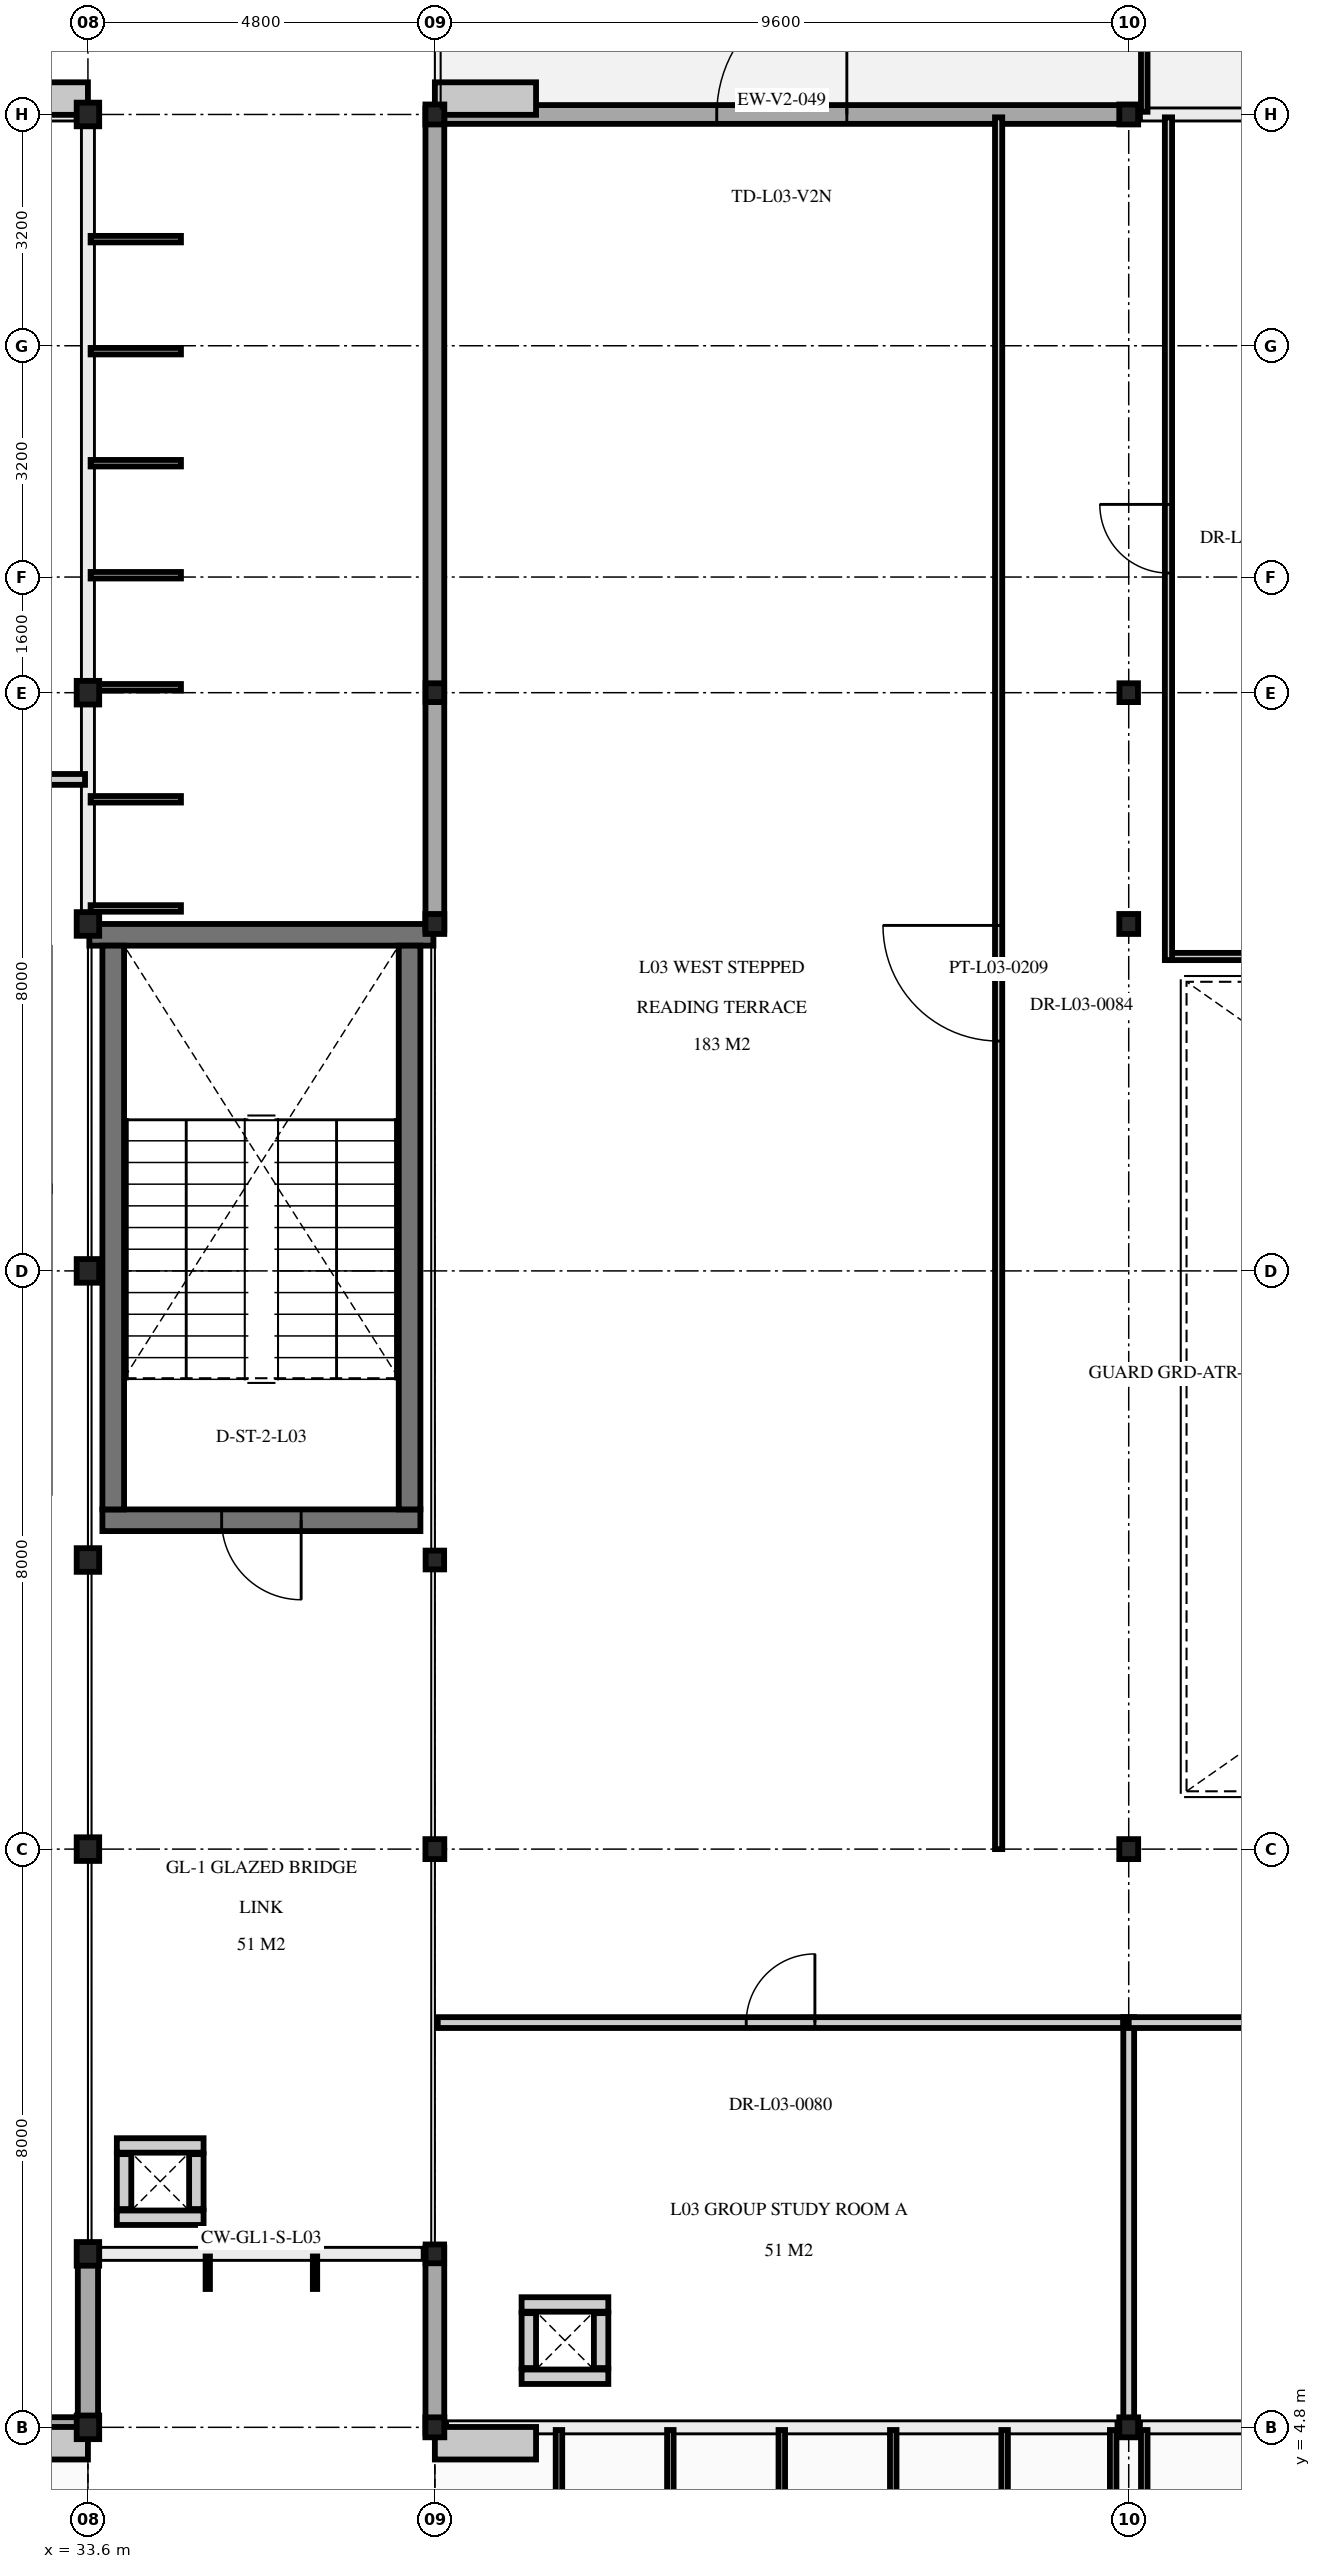
"""IFC4 building model, lengths in metres.
Left out: names, types, materials, properties, quantities, classifications, styles, units other than length and angle.
Written with IfcOpenShell. Run it as: python <this file> out.ifc"""

import sys

from ifc_helpers import new_model, si_unit, direction, frame, frame_2d, origin, origin_2d, place, context, subcontext, project, spatial, rectangle, i_section, extrude, element, fill, save


model = new_model("IFC4")
c1 = context("Model", 3, precision=1e-05, world=origin(), true_north=direction((0.0, 1.0)))
c2 = subcontext(c1, "Body", "Model", "MODEL_VIEW")
j1 = project(units=[si_unit("LENGTHUNIT", "METRE"), si_unit("PLANEANGLEUNIT", "RADIAN")], contexts=[c1])
p1 = place(None, origin())
s1 = spatial("IfcSite", under=j1, at=p1, CompositionType="ELEMENT")
p2 = place(p1, origin())
s2 = spatial("IfcBuilding", under=s1, at=p2, CompositionType="ELEMENT")
p3 = place(p2, frame((0.0, 0.0, 14.1)))
s3 = spatial("IfcBuildingStorey", under=s2, at=p3, CompositionType="ELEMENT", Elevation=14.1)
for number, where, z_axis, x_axis in (
    (1, (33.6, 4.8, 0.0), (0.0, 0.0, 1.0), (1.0, 0.0, 0.0)),
    (2, (33.6, 36.8, 0.0), (0.0, 0.0, 1.0), (1.0, 0.0, 0.0)),
    (3, (33.6, 7.2, 0.0), (0.0, 0.0, 1.0), (1.0, 0.0, 0.0)),
    (4, (33.6, 12.8, 0.0), (0.0, 0.0, 1.0), (1.0, 0.0, 0.0)),
    (5, (33.6, 16.8, 0.0), (0.0, 0.0, 1.0), (1.0, 0.0, 0.0)),
    (6, (33.6, 20.8, 0.0), (0.0, 0.0, 1.0), (1.0, 0.0, 0.0)),
    (7, (33.6, 25.6, 0.0), (0.0, 0.0, 1.0), (1.0, 0.0, 0.0)),
    (8, (33.6, 28.8, 0.0), (0.0, 0.0, 1.0), (1.0, 0.0, 0.0)),
):
    element("IfcColumn", number, at=place(p3, frame(where, z_axis=z_axis, x_axis=x_axis)), inside=s3, PredefinedType="COLUMN", context=c2, shape_type="SweptSolid", body=[
        extrude(i_section(OverallWidth=0.311, OverallDepth=0.327, WebThickness=0.016, FlangeThickness=0.025, at=origin_2d()), origin(), (0.0, 0.0, 1.0), 4.5),
    ])
for number, where, z_axis, x_axis in (
    (9, (38.4, 4.8, 0.0), (0.0, 0.0, 1.0), (1.0, 0.0, 0.0)),
    (10, (38.4, 12.8, 0.0), (0.0, 0.0, 1.0), (1.0, 0.0, 0.0)),
    (11, (38.4, 25.6, 0.0), (0.0, 0.0, 1.0), (1.0, 0.0, 0.0)),
    (12, (38.4, 36.8, 0.0), (0.0, 0.0, 1.0), (1.0, 0.0, 0.0)),
    (13, (48.0, 4.8, 0.0), (0.0, 0.0, 1.0), (1.0, 0.0, 0.0)),
    (14, (48.0, 12.8, 0.0), (0.0, 0.0, 1.0), (1.0, 0.0, 0.0)),
    (15, (48.0, 25.6, 0.0), (0.0, 0.0, 1.0), (1.0, 0.0, 0.0)),
    (16, (48.0, 36.8, 0.0), (0.0, 0.0, 1.0), (1.0, 0.0, 0.0)),
):
    element("IfcColumn", number, at=place(p3, frame(where, z_axis=z_axis, x_axis=x_axis)), inside=s3, PredefinedType="COLUMN", context=c2, shape_type="SweptSolid", body=[
        extrude(i_section(OverallWidth=0.261, OverallDepth=0.276, WebThickness=0.015, FlangeThickness=0.025, at=origin_2d()), origin(), (0.0, 0.0, 1.0), 4.5),
    ])
for number, where, z_axis, x_axis in (
    (17, (38.4, 28.8, 0.0), (0.0, 0.0, 1.0), (1.0, 0.0, 0.0)),
    (18, (48.0, 28.8, 0.0), (0.0, 0.0, 1.0), (1.0, 0.0, 0.0)),
    (19, (38.4, 7.2, 0.0), (0.0, 0.0, 1.0), (1.0, 0.0, 0.0)),
    (20, (38.4, 16.8, 0.0), (0.0, 0.0, 1.0), (1.0, 0.0, 0.0)),
):
    element("IfcColumn", number, at=place(p3, frame(where, z_axis=z_axis, x_axis=x_axis)), inside=s3, PredefinedType="COLUMN", context=c2, shape_type="SweptSolid", body=[
        extrude(i_section(OverallWidth=0.256, OverallDepth=0.26, WebThickness=0.01, FlangeThickness=0.017, at=origin_2d()), origin(), (0.0, 0.0, 1.0), 4.5),
    ])
p4 = place(p3, frame((38.2, 17.35, 0.0), z_axis=(0.0, 0.0, 1.0), x_axis=(-1.0, 0.0, 0.0)))
e21 = element("IfcWall", 21, at=p4, inside=s3, PredefinedType="SHEAR", context=c2, shape_type="SweptSolid", body=[
    extrude(rectangle(XDim=4.4, YDim=0.3, at=frame_2d((2.2, 0.0))), origin(), (0.0, 0.0, 1.0), 4.25),
])
p5 = place(p4, frame((1.65, 0.0, 0.0)))
e22 = element("IfcOpeningElement", 22, at=p5, cuts=e21, PredefinedType="OPENING", context=c2, shape_type="SweptSolid", body=[
    extrude(rectangle(XDim=1.1, YDim=2.2, at=frame_2d((0.55, 1.1))), frame((0.0, 0.16, 0.0), z_axis=(0.0, -1.0, 0.0), x_axis=(1.0, 0.0, 0.0)), (0.0, 0.0, 1.0), 0.32),
])
p6 = place(p3, frame((33.62, 25.45, 0.0), z_axis=(0.0, 0.0, 1.0), x_axis=(1.0, 0.0, 0.0)))
e23 = element("IfcWall", 23, at=p6, inside=s3, PredefinedType="SHEAR", context=c2, shape_type="SweptSolid", body=[
    extrude(rectangle(XDim=4.76, YDim=0.3, at=frame_2d((2.38, 0.0))), origin(), (0.0, 0.0, 1.0), 4.25),
])
for number, where, z_axis, x_axis in (
    (24, (33.95, 17.5, 0.0), (0.0, 0.0, 1.0), (0.0, 1.0, 0.0)),
    (25, (38.05, 25.3, 0.0), (0.0, 0.0, 1.0), (0.0, -1.0, 0.0)),
):
    element("IfcWall", number, at=place(p3, frame(where, z_axis=z_axis, x_axis=x_axis)), inside=s3, PredefinedType="SHEAR", context=c2, shape_type="SweptSolid", body=[
        extrude(rectangle(XDim=7.8, YDim=0.3, at=frame_2d((3.9, 0.0))), origin(), (0.0, 0.0, 1.0), 4.25),
    ])
for number, where, z_axis, x_axis in (
    (26, (40.8, 5.5, 0.0), (0.0, 0.0, 1.0), (-1.0, 0.0, 0.0)),
    (27, (39.6, 6.5, 0.0), (0.0, 0.0, 1.0), (1.0, 0.0, 0.0)),
):
    element("IfcWall", number, at=place(p3, frame(where, z_axis=z_axis, x_axis=x_axis)), inside=s3, PredefinedType="PARTITIONING", context=c2, shape_type="SweptSolid", body=[
        extrude(rectangle(XDim=1.2, YDim=0.2, at=frame_2d((0.6, 0.0))), origin(), (0.0, 0.0, 1.0), 3.75),
    ])
for number, where, z_axis, x_axis in (
    (28, (39.7, 5.62, 0.0), (0.0, 0.0, 1.0), (0.0, 1.0, 0.0)),
    (29, (40.7, 6.38, 0.0), (0.0, 0.0, 1.0), (0.0, -1.0, 0.0)),
):
    element("IfcWall", number, at=place(p3, frame(where, z_axis=z_axis, x_axis=x_axis)), inside=s3, PredefinedType="PARTITIONING", context=c2, shape_type="SweptSolid", body=[
        extrude(rectangle(XDim=0.76, YDim=0.2, at=frame_2d((0.38, 0.0))), origin(), (0.0, 0.0, 1.0), 3.75),
    ])
for number, where, z_axis, x_axis in (
    (30, (35.2, 7.7, 0.0), (0.0, 0.0, 1.0), (-1.0, 0.0, 0.0)),
    (31, (34.0, 8.7, 0.0), (0.0, 0.0, 1.0), (1.0, 0.0, 0.0)),
):
    element("IfcWall", number, at=place(p3, frame(where, z_axis=z_axis, x_axis=x_axis)), inside=s3, PredefinedType="PARTITIONING", context=c2, shape_type="SweptSolid", body=[
        extrude(rectangle(XDim=1.2, YDim=0.2, at=frame_2d((0.6, 0.0))), origin(), (0.0, 0.0, 1.0), 3.75),
    ])
for number, where, z_axis, x_axis in (
    (32, (34.1, 7.82, 0.0), (0.0, 0.0, 1.0), (0.0, 1.0, 0.0)),
    (33, (35.1, 8.58, 0.0), (0.0, 0.0, 1.0), (0.0, -1.0, 0.0)),
):
    element("IfcWall", number, at=place(p3, frame(where, z_axis=z_axis, x_axis=x_axis)), inside=s3, PredefinedType="PARTITIONING", context=c2, shape_type="SweptSolid", body=[
        extrude(rectangle(XDim=0.76, YDim=0.2, at=frame_2d((0.38, 0.0))), origin(), (0.0, 0.0, 1.0), 3.75),
    ])
p7 = place(p3, frame((33.685, 4.8, 0.0), z_axis=(0.0, 0.0, 1.0), x_axis=(-1.0, 0.0, 0.0)))
e34 = element("IfcWall", 34, at=p7, inside=s3, PredefinedType="SOLIDWALL", context=c2, shape_type="SweptSolid", body=[
    extrude(rectangle(XDim=0.92, YDim=0.28, at=frame_2d((0.46, 0.0))), origin(), (0.0, 0.0, 1.0), 3.675),
])
p8 = place(p3, frame((33.6, 7.285, 0.0), z_axis=(0.0, 0.0, 1.0), x_axis=(0.0, -1.0, 0.0)))
e35 = element("IfcWall", 35, at=p8, inside=s3, PredefinedType="SOLIDWALL", context=c2, shape_type="SweptSolid", body=[
    extrude(rectangle(XDim=2.57, YDim=0.28, at=frame_2d((1.285, 0.0))), origin(), (0.0, 0.0, 1.0), 3.675),
])
p9 = place(p3, frame((38.315, 36.8, 0.0), z_axis=(0.0, 0.0, 1.0), x_axis=(1.0, 0.0, 0.0)))
e36 = element("IfcWall", 36, at=p9, inside=s3, PredefinedType="SOLIDWALL", context=c2, shape_type="SweptSolid", body=[
    extrude(rectangle(XDim=9.77, YDim=0.26, at=frame_2d((4.885, 0.0))), origin(), (0.0, 0.0, 1.0), 3.862),
])
p10 = place(p9, frame((3.985, 0.0, 0.0)))
e37 = element("IfcOpeningElement", 37, at=p10, cuts=e36, PredefinedType="OPENING", context=c2, shape_type="SweptSolid", body=[
    extrude(rectangle(XDim=1.8, YDim=2.3, at=frame_2d((0.9, 1.15))), frame((0.0, 0.14, 0.0), z_axis=(0.0, -1.0, 0.0), x_axis=(1.0, 0.0, 0.0)), (0.0, 0.0, 1.0), 0.28),
])
p11 = place(p3, frame((38.4, 4.715, 0.0), z_axis=(0.0, 0.0, 1.0), x_axis=(0.0, 1.0, 0.0)))
e38 = element("IfcWall", 38, at=p11, inside=s3, PredefinedType="SOLIDWALL", context=c2, shape_type="SweptSolid", body=[
    extrude(rectangle(XDim=2.57, YDim=0.26, at=frame_2d((1.285, 0.0))), origin(), (0.0, 0.0, 1.0), 3.835),
])
p12 = place(p3, frame((38.4, 25.515, 0.0), z_axis=(0.0, 0.0, 1.0), x_axis=(0.0, 1.0, 0.0)))
e39 = element("IfcWall", 39, at=p12, inside=s3, PredefinedType="SOLIDWALL", context=c2, shape_type="SweptSolid", body=[
    extrude(rectangle(XDim=11.37, YDim=0.26, at=frame_2d((5.685, 0.0))), origin(), (0.0, 0.0, 1.0), 3.835),
])
p13 = place(p3, frame((26.2, 27.6, 0.0), z_axis=(0.0, 0.0, 1.0), x_axis=(1.0, 0.0, 0.0)))
e40 = element("IfcWall", 40, at=p13, inside=s3, PredefinedType="PARTITIONING", context=c2, shape_type="SweptSolid", body=[
    extrude(rectangle(XDim=7.36, YDim=0.15, at=frame_2d((3.68, 0.0))), origin(), (0.0, 0.0, 1.0), 3.625),
])
p14 = place(p13, frame((1.41, 0.0, 0.0)))
e41 = element("IfcOpeningElement", 41, at=p14, cuts=e40, PredefinedType="OPENING", context=c2, shape_type="SweptSolid", body=[
    extrude(rectangle(XDim=0.95, YDim=2.15, at=frame_2d((0.475, 1.075))), frame((0.0, 0.085, 0.0), z_axis=(0.0, -1.0, 0.0), x_axis=(1.0, 0.0, 0.0)), (0.0, 0.0, 1.0), 0.17),
])
p15 = place(p3, frame((38.44, 10.4, 0.0), z_axis=(0.0, 0.0, 1.0), x_axis=(1.0, 0.0, 0.0)))
e42 = element("IfcWall", 42, at=p15, inside=s3, PredefinedType="PARTITIONING", context=c2, shape_type="SweptSolid", body=[
    extrude(rectangle(XDim=9.485, YDim=0.15, at=frame_2d((4.743, 0.0))), origin(), (0.0, 0.0, 1.0), 3.862),
])
p16 = place(p15, frame((4.268, 0.0, 0.0)))
e43 = element("IfcOpeningElement", 43, at=p16, cuts=e42, PredefinedType="OPENING", context=c2, shape_type="SweptSolid", body=[
    extrude(rectangle(XDim=0.95, YDim=2.15, at=frame_2d((0.475, 1.075))), frame((0.0, 0.085, 0.0), z_axis=(0.0, -1.0, 0.0), x_axis=(1.0, 0.0, 0.0)), (0.0, 0.0, 1.0), 0.17),
])
p17 = place(p3, frame((48.0, 4.84, 0.0), z_axis=(0.0, 0.0, 1.0), x_axis=(0.0, 1.0, 0.0)))
e44 = element("IfcWall", 44, at=p17, inside=s3, PredefinedType="PARTITIONING", context=c2, shape_type="SweptSolid", body=[
    extrude(rectangle(XDim=5.635, YDim=0.15, at=frame_2d((2.817, 0.0))), origin(), (0.0, 0.0, 1.0), 3.862),
])
p18 = place(p3, frame((48.0, 10.4, 0.0), z_axis=(0.0, 0.0, 1.0), x_axis=(1.0, 0.0, 0.0)))
e45 = element("IfcWall", 45, at=p18, inside=s3, PredefinedType="PARTITIONING", context=c2, shape_type="SweptSolid", body=[
    extrude(rectangle(XDim=9.525, YDim=0.15, at=frame_2d((4.762, 0.0))), origin(), (0.0, 0.0, 1.0), 3.862),
])
p19 = place(p18, frame((4.287, 0.0, 0.0)))
e46 = element("IfcOpeningElement", 46, at=p19, cuts=e45, PredefinedType="OPENING", context=c2, shape_type="SweptSolid", body=[
    extrude(rectangle(XDim=0.95, YDim=2.15, at=frame_2d((0.475, 1.075))), frame((0.0, 0.085, 0.0), z_axis=(0.0, -1.0, 0.0), x_axis=(1.0, 0.0, 0.0)), (0.0, 0.0, 1.0), 0.17),
])
p20 = place(p3, frame((46.2, 12.8, 0.0), z_axis=(0.0, 0.0, 1.0), x_axis=(0.0, 1.0, 0.0)))
e47 = element("IfcWall", 47, at=p20, inside=s3, PredefinedType="MOVABLE", context=c2, shape_type="SweptSolid", body=[
    extrude(rectangle(XDim=23.96, YDim=0.1, at=frame_2d((11.98, 0.0))), origin(), (0.0, 0.0, 1.0), 3.965),
])
p21 = place(p20, frame((11.18, 0.0, 0.0)))
e48 = element("IfcOpeningElement", 48, at=p21, cuts=e47, PredefinedType="OPENING", context=c2, shape_type="SweptSolid", body=[
    extrude(rectangle(XDim=1.6, YDim=2.25, at=frame_2d((0.8, 1.125))), frame((0.0, 0.06, 0.0), z_axis=(0.0, -1.0, 0.0), x_axis=(1.0, 0.0, 0.0)), (0.0, 0.0, 1.0), 0.12),
])
p22 = place(p3, frame((48.6, 25.15, 0.0), z_axis=(0.0, 0.0, 1.0), x_axis=(1.0, 0.0, 0.0)))
e49 = element("IfcWall", 49, at=p22, inside=s3, PredefinedType="MOVABLE", context=c2, shape_type="SweptSolid", body=[
    extrude(rectangle(XDim=8.95, YDim=0.1, at=frame_2d((4.475, 0.0))), origin(), (0.0, 0.0, 1.0), 4.25),
])
p23 = place(p3, frame((48.55, 25.1, 0.0), z_axis=(0.0, 0.0, 1.0), x_axis=(0.0, 1.0, 0.0)))
e50 = element("IfcWall", 50, at=p23, inside=s3, PredefinedType="MOVABLE", context=c2, shape_type="SweptSolid", body=[
    extrude(rectangle(XDim=11.66, YDim=0.1, at=frame_2d((5.83, 0.0))), origin(), (0.0, 0.0, 1.0), 3.965),
])
p24 = place(p23, frame((5.355, 0.0, 0.0)))
e51 = element("IfcOpeningElement", 51, at=p24, cuts=e50, PredefinedType="OPENING", context=c2, shape_type="SweptSolid", body=[
    extrude(rectangle(XDim=0.95, YDim=2.15, at=frame_2d((0.475, 1.075))), frame((0.0, 0.06, 0.0), z_axis=(0.0, -1.0, 0.0), x_axis=(1.0, 0.0, 0.0)), (0.0, 0.0, 1.0), 0.12),
])
p25 = place(p5, origin())
e52 = element("IfcDoor", 52, at=p25, inside=s3, OperationType="SINGLE_SWING_LEFT", PredefinedType="DOOR", context=c2, shape_type="SweptSolid", body=[
    extrude(rectangle(XDim=1.1, YDim=2.2, at=frame_2d((0.55, 1.1))), frame((0.0, 0.025, 0.0), z_axis=(0.0, -1.0, 0.0), x_axis=(1.0, 0.0, 0.0)), (0.0, 0.0, 1.0), 0.05),
])
fill(e22, e52)
p26 = place(p10, origin())
e53 = element("IfcDoor", 53, at=p26, inside=s3, OperationType="SINGLE_SWING_RIGHT", PredefinedType="DOOR", context=c2, shape_type="SweptSolid", body=[
    extrude(rectangle(XDim=1.8, YDim=2.3, at=frame_2d((0.9, 1.15))), frame((0.0, 0.025, 0.0), z_axis=(0.0, -1.0, 0.0), x_axis=(1.0, 0.0, 0.0)), (0.0, 0.0, 1.0), 0.05),
])
fill(e37, e53)
p27 = place(p16, origin())
e54 = element("IfcDoor", 54, at=p27, inside=s3, OperationType="SINGLE_SWING_RIGHT", PredefinedType="DOOR", context=c2, shape_type="SweptSolid", body=[
    extrude(rectangle(XDim=0.95, YDim=2.15, at=frame_2d((0.475, 1.075))), frame((0.0, 0.025, 0.0), z_axis=(0.0, -1.0, 0.0), x_axis=(1.0, 0.0, 0.0)), (0.0, 0.0, 1.0), 0.05),
])
fill(e43, e54)
p28 = place(p21, origin())
e55 = element("IfcDoor", 55, at=p28, inside=s3, OperationType="DOUBLE_DOOR_SINGLE_SWING", PredefinedType="DOOR", context=c2, shape_type="SweptSolid", body=[
    extrude(rectangle(XDim=1.6, YDim=2.25, at=frame_2d((0.8, 1.125))), frame((0.0, 0.025, 0.0), z_axis=(0.0, -1.0, 0.0), x_axis=(1.0, 0.0, 0.0)), (0.0, 0.0, 1.0), 0.05),
])
fill(e48, e55)
p29 = place(p24, origin())
e56 = element("IfcDoor", 56, at=p29, inside=s3, OperationType="SINGLE_SWING_RIGHT", PredefinedType="DOOR", context=c2, shape_type="SweptSolid", body=[
    extrude(rectangle(XDim=0.95, YDim=2.15, at=frame_2d((0.475, 1.075))), frame((0.0, 0.025, 0.0), z_axis=(0.0, -1.0, 0.0), x_axis=(1.0, 0.0, 0.0)), (0.0, 0.0, 1.0), 0.05),
])
fill(e51, e56)
save(model, sys.argv[1])
